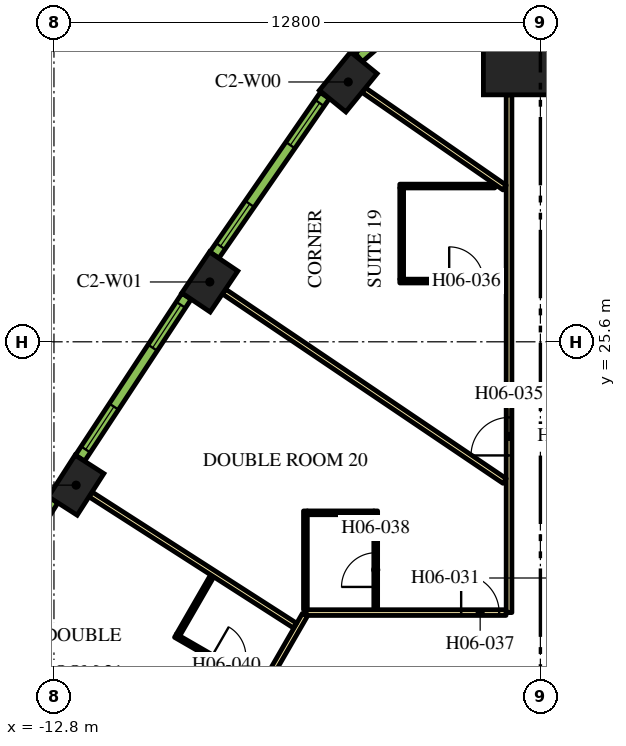
"""IFC4 building model, lengths in metres.
Left out: names, types, materials, properties, quantities, classifications, styles, units other than length and angle.
Written with IfcOpenShell. Run it as: python <this file> out.ifc"""

import sys

from ifc_helpers import new_model, si_unit, direction, frame, frame_2d, origin, origin_2d, place, context, subcontext, project, spatial, rectangle, extrude, element, fill, save


model = new_model("IFC4")
c1 = context("Model", 3, precision=1e-05, world=origin(), true_north=direction((0.0, 1.0)))
c2 = subcontext(c1, "Body", "Model", "MODEL_VIEW")
j1 = project(units=[si_unit("LENGTHUNIT", "METRE"), si_unit("PLANEANGLEUNIT", "RADIAN")], contexts=[c1])
p1 = place(None, origin())
s1 = spatial("IfcSite", under=j1, at=p1, CompositionType="ELEMENT")
p2 = place(p1, origin())
s2 = spatial("IfcBuilding", under=s1, at=p2, CompositionType="ELEMENT")
p3 = place(p2, frame((0.0, 0.0, 87.6)))
s3 = spatial("IfcBuildingStorey", under=s2, at=p3, CompositionType="ELEMENT", Elevation=87.6)
p4 = place(p3, frame((0.0, 33.598, 0.0), z_axis=(0.0, 0.0, 1.0), x_axis=(0.0, 1.0, 0.0)))
e1 = element("IfcColumn", 1, at=p4, inside=s3, PredefinedType="COLUMN", context=c2, shape_type="SweptSolid", body=[
    extrude(rectangle(XDim=3.0, YDim=3.0, at=origin_2d()), origin(), (0.0, 0.0, 1.0), 3.9),
])
for number, where, z_axis, x_axis in (
    (2, (-5.056, 32.437, 0.0), (0.0, 0.0, 1.0), (-0.632, -0.775, 0.0)),
    (3, (-8.699, 27.174, 0.0), (0.0, 0.0, 1.0), (-0.559, -0.829, 0.0)),
    (4, (-12.217, 21.828, 0.0), (0.0, 0.0, 1.0), (-0.54, -0.842, 0.0)),
):
    element("IfcColumn", number, at=place(p3, frame(where, z_axis=z_axis, x_axis=x_axis)), inside=s3, PredefinedType="COLUMN", context=c2, shape_type="SweptSolid", body=[
        extrude(rectangle(XDim=1.3, YDim=0.9, at=origin_2d()), origin(), (0.0, 0.0, 1.0), 3.9),
    ])
p5 = place(p3, frame((-0.825, 18.475, 0.0), z_axis=(0.0, 0.0, 1.0), x_axis=(0.0, 1.0, 0.0)))
e5 = element("IfcWall", 5, at=p5, inside=s3, PredefinedType="PARTITIONING", context=c2, shape_type="SweptSolid", body=[
    extrude(rectangle(XDim=13.623, YDim=0.15, at=frame_2d((6.812, 0.0))), origin(), (0.0, 0.0, 1.0), 2.75),
])
p6 = place(p5, frame((4.135, 0.0, 0.0)))
e6 = element("IfcOpeningElement", 6, at=p6, cuts=e5, PredefinedType="OPENING", context=c2, shape_type="SweptSolid", body=[
    extrude(rectangle(XDim=1.0, YDim=2.1, at=frame_2d((0.5, 1.05))), frame((0.0, 0.085, 0.0), z_axis=(0.0, -1.0, 0.0), x_axis=(1.0, 0.0, 0.0)), (0.0, 0.0, 1.0), 0.17),
])
p7 = place(p3, frame((-6.163, 18.475, 0.0), z_axis=(0.0, 0.0, 1.0), x_axis=(1.0, 0.0, 0.0)))
e7 = element("IfcWall", 7, at=p7, inside=s3, PredefinedType="PARTITIONING", context=c2, shape_type="SweptSolid", body=[
    extrude(rectangle(XDim=5.258, YDim=0.15, at=frame_2d((2.629, 0.0))), origin(), (0.0, 0.0, 1.0), 2.75),
])
p8 = place(p7, frame((4.078, 0.0, 0.0)))
e8 = element("IfcOpeningElement", 8, at=p8, cuts=e7, PredefinedType="OPENING", context=c2, shape_type="SweptSolid", body=[
    extrude(rectangle(XDim=1.0, YDim=2.1, at=frame_2d((0.5, 1.05))), frame((0.0, 0.085, 0.0), z_axis=(0.0, -1.0, 0.0), x_axis=(1.0, 0.0, 0.0)), (0.0, 0.0, 1.0), 0.17),
])
p9 = place(p3, frame((-19.081, -3.9, 0.0), z_axis=(0.0, 0.0, 1.0), x_axis=(0.499998313975, 0.866026377209, 0.0)))
e9 = element("IfcWall", 9, at=p9, inside=s3, PredefinedType="PARTITIONING", context=c2, shape_type="SweptSolid", body=[
    extrude(rectangle(XDim=25.766, YDim=0.15, at=frame_2d((12.883, 0.0))), origin(), (0.0, 0.0, 1.0), 2.75),
])
p10 = place(p9, frame((19.306, 0.0, 0.0)))
e10 = element("IfcOpeningElement", 10, at=p10, cuts=e9, PredefinedType="OPENING", context=c2, shape_type="SweptSolid", body=[
    extrude(rectangle(XDim=1.0, YDim=2.1, at=frame_2d((0.5, 1.05))), frame((0.0, 0.085, 0.0), z_axis=(0.0, -1.0, 0.0), x_axis=(1.0, 0.0, 0.0)), (0.0, 0.0, 1.0), 0.17),
])
p11 = place(p9, frame((18.0, 0.0, 0.0)))
e11 = element("IfcOpeningElement", 11, at=p11, cuts=e9, PredefinedType="OPENING", context=c2, shape_type="SweptSolid", body=[
    extrude(rectangle(XDim=1.0, YDim=2.1, at=frame_2d((0.5, 1.05))), frame((0.0, 0.085, 0.0), z_axis=(0.0, -1.0, 0.0), x_axis=(1.0, 0.0, 0.0)), (0.0, 0.0, 1.0), 0.17),
])
p12 = place(p9, frame((10.874, 0.0, 0.0)))
e12 = element("IfcOpeningElement", 12, at=p12, cuts=e9, PredefinedType="OPENING", context=c2, shape_type="SweptSolid", body=[
    extrude(rectangle(XDim=0.9, YDim=2.1, at=frame_2d((0.45, 1.05))), frame((0.0, 0.085, 0.0), z_axis=(0.0, -1.0, 0.0), x_axis=(1.0, 0.0, 0.0)), (0.0, 0.0, 1.0), 0.17),
])
p13 = place(p9, frame((8.548, 0.0, 0.0)))
e13 = element("IfcOpeningElement", 13, at=p13, cuts=e9, PredefinedType="OPENING", context=c2, shape_type="SweptSolid", body=[
    extrude(rectangle(XDim=1.1, YDim=2.1, at=frame_2d((0.55, 1.05))), frame((0.0, 0.085, 0.0), z_axis=(0.0, -1.0, 0.0), x_axis=(1.0, 0.0, 0.0)), (0.0, 0.0, 1.0), 0.17),
])
p14 = place(p9, frame((0.18, 0.0, 0.0)))
e14 = element("IfcOpeningElement", 14, at=p14, cuts=e9, PredefinedType="OPENING", context=c2, shape_type="SweptSolid", body=[
    extrude(rectangle(XDim=1.0, YDim=2.1, at=frame_2d((0.5, 1.05))), frame((0.0, 0.085, 0.0), z_axis=(0.0, -1.0, 0.0), x_axis=(1.0, 0.0, 0.0)), (0.0, 0.0, 1.0), 0.17),
])
p15 = place(p3, frame((-11.838, 21.585, 0.0), z_axis=(0.0, 0.0, 1.0), x_axis=(0.841699322813, -0.539946525108, 0.0)))
e15 = element("IfcWall", 15, at=p15, inside=s3, PredefinedType="PARTITIONING", context=c2, shape_type="SweptSolid", body=[
    extrude(rectangle(XDim=6.392, YDim=0.15, at=frame_2d((3.196, 0.0))), origin(), (0.0, 0.0, 1.0), 2.75),
])
p16 = place(p3, frame((-8.326, 26.923, 0.0), z_axis=(0.0, 0.0, 1.0), x_axis=(0.828836601893, -0.5594907393, 0.0)))
e16 = element("IfcWall", 16, at=p16, inside=s3, PredefinedType="PARTITIONING", context=c2, shape_type="SweptSolid", body=[
    extrude(rectangle(XDim=8.909, YDim=0.15, at=frame_2d((4.455, 0.0))), origin(), (0.0, 0.0, 1.0), 2.75),
])
p17 = place(p3, frame((-4.649, 32.223, 0.0), z_axis=(0.0, 0.0, 1.0), x_axis=(0.822262349475, -0.569108626394, 0.0)))
e17 = element("IfcWall", 17, at=p17, inside=s3, PredefinedType="PARTITIONING", context=c2, shape_type="SweptSolid", body=[
    extrude(rectangle(XDim=4.51, YDim=0.15, at=frame_2d((2.255, 0.0))), origin(), (0.0, 0.0, 1.0), 2.75),
])
p18 = place(p3, frame((-3.7, 27.198, 0.0), z_axis=(0.0, 0.0, 1.0), x_axis=(1.0, 0.0, 0.0)))
e18 = element("IfcWall", 18, at=p18, inside=s3, PredefinedType="PARTITIONING", context=c2, shape_type="SweptSolid", body=[
    extrude(rectangle(XDim=2.8, YDim=0.1, at=frame_2d((1.4, 0.0))), origin(), (0.0, 0.0, 1.0), 2.75),
])
p19 = place(p18, frame((1.3, 0.0, 0.0)))
e19 = element("IfcOpeningElement", 19, at=p19, cuts=e18, PredefinedType="OPENING", context=c2, shape_type="SweptSolid", body=[
    extrude(rectangle(XDim=0.9, YDim=2.1, at=frame_2d((0.45, 1.05))), frame((0.0, 0.06, 0.0), z_axis=(0.0, -1.0, 0.0), x_axis=(1.0, 0.0, 0.0)), (0.0, 0.0, 1.0), 0.12),
])
p20 = place(p3, frame((-3.65, 27.248, 0.0), z_axis=(0.0, 0.0, 1.0), x_axis=(0.0, 1.0, 0.0)))
e20 = element("IfcWall", 20, at=p20, inside=s3, PredefinedType="PARTITIONING", context=c2, shape_type="SweptSolid", body=[
    extrude(rectangle(XDim=2.4, YDim=0.1, at=frame_2d((1.2, 0.0))), origin(), (0.0, 0.0, 1.0), 2.75),
])
p21 = place(p3, frame((-1.2, 29.698, 0.0), z_axis=(0.0, 0.0, 1.0), x_axis=(-1.0, 0.0, 0.0)))
e21 = element("IfcWall", 21, at=p21, inside=s3, PredefinedType="PARTITIONING", context=c2, shape_type="SweptSolid", body=[
    extrude(rectangle(XDim=2.5, YDim=0.1, at=frame_2d((1.25, 0.0))), origin(), (0.0, 0.0, 1.0), 2.75),
])
p22 = place(p3, frame((-4.333, 18.55, 0.0), z_axis=(0.0, 0.0, 1.0), x_axis=(0.0, 1.0, 0.0)))
e22 = element("IfcWall", 22, at=p22, inside=s3, PredefinedType="PARTITIONING", context=c2, shape_type="SweptSolid", body=[
    extrude(rectangle(XDim=2.6, YDim=0.1, at=frame_2d((1.3, 0.0))), origin(), (0.0, 0.0, 1.0), 2.75),
])
p23 = place(p22, frame((0.6, 0.0, 0.0)))
e23 = element("IfcOpeningElement", 23, at=p23, cuts=e22, PredefinedType="OPENING", context=c2, shape_type="SweptSolid", body=[
    extrude(rectangle(XDim=0.9, YDim=2.1, at=frame_2d((0.45, 1.05))), frame((0.0, 0.06, 0.0), z_axis=(0.0, -1.0, 0.0), x_axis=(1.0, 0.0, 0.0)), (0.0, 0.0, 1.0), 0.12),
])
p24 = place(p3, frame((-4.383, 21.1, 0.0), z_axis=(0.0, 0.0, 1.0), x_axis=(-1.0, 0.0, 0.0)))
e24 = element("IfcWall", 24, at=p24, inside=s3, PredefinedType="PARTITIONING", context=c2, shape_type="SweptSolid", body=[
    extrude(rectangle(XDim=1.75, YDim=0.1, at=frame_2d((0.875, 0.0))), origin(), (0.0, 0.0, 1.0), 2.75),
])
p25 = place(p3, frame((-6.183, 18.55, 0.0), z_axis=(0.0, 0.0, 1.0), x_axis=(0.0, 1.0, 0.0)))
e25 = element("IfcWall", 25, at=p25, inside=s3, PredefinedType="PARTITIONING", context=c2, shape_type="SweptSolid", body=[
    extrude(rectangle(XDim=2.6, YDim=0.1, at=frame_2d((1.3, 0.0))), origin(), (0.0, 0.0, 1.0), 2.75),
])
p26 = place(p3, frame((-9.603, 17.868, 0.0), z_axis=(0.0, 0.0, 1.0), x_axis=(0.866021400173, -0.500006934395, 0.0)))
e26 = element("IfcWall", 26, at=p26, inside=s3, PredefinedType="PARTITIONING", context=c2, shape_type="SweptSolid", body=[
    extrude(rectangle(XDim=2.6, YDim=0.1, at=frame_2d((1.3, 0.0))), origin(), (0.0, 0.0, 1.0), 2.75),
])
p27 = place(p26, frame((1.1, 0.0, 0.0)))
e27 = element("IfcOpeningElement", 27, at=p27, cuts=e26, PredefinedType="OPENING", context=c2, shape_type="SweptSolid", body=[
    extrude(rectangle(XDim=0.9, YDim=2.1, at=frame_2d((0.45, 1.05))), frame((0.0, 0.06, 0.0), z_axis=(0.0, -1.0, 0.0), x_axis=(1.0, 0.0, 0.0)), (0.0, 0.0, 1.0), 0.12),
])
p28 = place(p3, frame((-9.534, 17.886, 0.0), z_axis=(0.0, 0.0, 1.0), x_axis=(0.500041240653, 0.866001592173, 0.0)))
e28 = element("IfcWall", 28, at=p28, inside=s3, PredefinedType="PARTITIONING", context=c2, shape_type="SweptSolid", body=[
    extrude(rectangle(XDim=1.79, YDim=0.1, at=frame_2d((0.895, 0.0))), origin(), (0.0, 0.0, 1.0), 2.75),
])
p29 = place(p3, frame((-3.405, 34.275, 0.0), z_axis=(0.0, 0.0, 1.0), x_axis=(-0.754882764627, -0.655859749999, 0.0)))
e29 = element("IfcWall", 29, at=p29, inside=s3, PredefinedType="SOLIDWALL", context=c2, shape_type="SweptSolid", body=[
    extrude(rectangle(XDim=1.82, YDim=0.29, at=frame_2d((0.91, 0.0))), origin(), (0.0, 0.0, 1.0), 3.65),
])
p30 = place(p29, frame((0.46, 0.0, 0.9)))
e30 = element("IfcOpeningElement", 30, at=p30, cuts=e29, PredefinedType="OPENING", context=c2, shape_type="SweptSolid", body=[
    extrude(rectangle(XDim=0.9, YDim=2.15, at=frame_2d((0.45, 1.075))), frame((0.0, 0.155, 0.0), z_axis=(0.0, -1.0, 0.0), x_axis=(1.0, 0.0, 0.0)), (0.0, 0.0, 1.0), 0.31),
])
p31 = place(p3, frame((-5.673, 32.081, 0.0), z_axis=(0.0, 0.0, 1.0), x_axis=(-0.569113019126, -0.822259309136, 0.0)))
e31 = element("IfcWall", 31, at=p31, inside=s3, PredefinedType="SOLIDWALL", context=c2, shape_type="SweptSolid", body=[
    extrude(rectangle(XDim=5.107, YDim=0.29, at=frame_2d((2.553, 0.0))), origin(), (0.0, 0.0, 1.0), 3.65),
])
p32 = place(p31, frame((0.24, 0.0, 0.9)))
e32 = element("IfcOpeningElement", 32, at=p32, cuts=e31, PredefinedType="OPENING", context=c2, shape_type="SweptSolid", body=[
    extrude(rectangle(XDim=1.35, YDim=2.15, at=frame_2d((0.675, 1.075))), frame((0.0, 0.155, 0.0), z_axis=(0.0, -1.0, 0.0), x_axis=(1.0, 0.0, 0.0)), (0.0, 0.0, 1.0), 0.31),
])
p33 = place(p31, frame((3.471, 0.0, 0.9)))
e33 = element("IfcOpeningElement", 33, at=p33, cuts=e31, PredefinedType="OPENING", context=c2, shape_type="SweptSolid", body=[
    extrude(rectangle(XDim=1.35, YDim=2.15, at=frame_2d((0.675, 1.075))), frame((0.0, 0.155, 0.0), z_axis=(0.0, -1.0, 0.0), x_axis=(1.0, 0.0, 0.0)), (0.0, 0.0, 1.0), 0.31),
])
p34 = place(p3, frame((-9.311, 26.799, 0.0), z_axis=(0.0, 0.0, 1.0), x_axis=(-0.549741341923, -0.835334937005, 0.0)))
e34 = element("IfcWall", 34, at=p34, inside=s3, PredefinedType="SOLIDWALL", context=c2, shape_type="SweptSolid", body=[
    extrude(rectangle(XDim=5.1, YDim=0.29, at=frame_2d((2.55, 0.0))), origin(), (0.0, 0.0, 1.0), 3.65),
])
p35 = place(p34, frame((0.273, 0.0, 0.9)))
e35 = element("IfcOpeningElement", 35, at=p35, cuts=e34, PredefinedType="OPENING", context=c2, shape_type="SweptSolid", body=[
    extrude(rectangle(XDim=1.35, YDim=2.15, at=frame_2d((0.675, 1.075))), frame((0.0, 0.155, 0.0), z_axis=(0.0, -1.0, 0.0), x_axis=(1.0, 0.0, 0.0)), (0.0, 0.0, 1.0), 0.31),
])
p36 = place(p34, frame((3.478, 0.0, 0.9)))
e36 = element("IfcOpeningElement", 36, at=p36, cuts=e34, PredefinedType="OPENING", context=c2, shape_type="SweptSolid", body=[
    extrude(rectangle(XDim=1.35, YDim=2.15, at=frame_2d((0.675, 1.075))), frame((0.0, 0.155, 0.0), z_axis=(0.0, -1.0, 0.0), x_axis=(1.0, 0.0, 0.0)), (0.0, 0.0, 1.0), 0.31),
])
p37 = place(p3, frame((-12.82, 21.439, 0.0), z_axis=(0.0, 0.0, 1.0), x_axis=(-0.530072082134, -0.847952585787, 0.0)))
e37 = element("IfcWall", 37, at=p37, inside=s3, PredefinedType="SOLIDWALL", context=c2, shape_type="SweptSolid", body=[
    extrude(rectangle(XDim=5.1, YDim=0.29, at=frame_2d((2.55, 0.0))), origin(), (0.0, 0.0, 1.0), 3.65),
])
p38 = place(p37, frame((0.273, 0.0, 0.9)))
e38 = element("IfcOpeningElement", 38, at=p38, cuts=e37, PredefinedType="OPENING", context=c2, shape_type="SweptSolid", body=[
    extrude(rectangle(XDim=1.35, YDim=2.15, at=frame_2d((0.675, 1.075))), frame((0.0, 0.155, 0.0), z_axis=(0.0, -1.0, 0.0), x_axis=(1.0, 0.0, 0.0)), (0.0, 0.0, 1.0), 0.31),
])
p39 = place(p37, frame((3.478, 0.0, 0.9)))
e39 = element("IfcOpeningElement", 39, at=p39, cuts=e37, PredefinedType="OPENING", context=c2, shape_type="SweptSolid", body=[
    extrude(rectangle(XDim=1.35, YDim=2.15, at=frame_2d((0.675, 1.075))), frame((0.0, 0.155, 0.0), z_axis=(0.0, -1.0, 0.0), x_axis=(1.0, 0.0, 0.0)), (0.0, 0.0, 1.0), 0.31),
])
p40 = place(p6, origin())
e40 = element("IfcDoor", 40, at=p40, inside=s3, OperationType="SINGLE_SWING_LEFT", PredefinedType="DOOR", context=c2, shape_type="SweptSolid", body=[
    extrude(rectangle(XDim=1.0, YDim=2.1, at=frame_2d((0.5, 1.05))), frame((0.0, 0.025, 0.0), z_axis=(0.0, -1.0, 0.0), x_axis=(1.0, 0.0, 0.0)), (0.0, 0.0, 1.0), 0.05),
])
fill(e6, e40)
p41 = place(p19, origin())
e41 = element("IfcDoor", 41, at=p41, inside=s3, OperationType="SINGLE_SWING_LEFT", PredefinedType="DOOR", context=c2, shape_type="SweptSolid", body=[
    extrude(rectangle(XDim=0.9, YDim=2.1, at=frame_2d((0.45, 1.05))), frame((0.0, 0.025, 0.0), z_axis=(0.0, -1.0, 0.0), x_axis=(1.0, 0.0, 0.0)), (0.0, 0.0, 1.0), 0.05),
])
fill(e19, e41)
p42 = place(p8, origin())
e42 = element("IfcDoor", 42, at=p42, inside=s3, OperationType="SINGLE_SWING_RIGHT", PredefinedType="DOOR", context=c2, shape_type="SweptSolid", body=[
    extrude(rectangle(XDim=1.0, YDim=2.1, at=frame_2d((0.5, 1.05))), frame((0.0, 0.025, 0.0), z_axis=(0.0, -1.0, 0.0), x_axis=(1.0, 0.0, 0.0)), (0.0, 0.0, 1.0), 0.05),
])
fill(e8, e42)
p43 = place(p23, origin())
e43 = element("IfcDoor", 43, at=p43, inside=s3, OperationType="SINGLE_SWING_LEFT", PredefinedType="DOOR", context=c2, shape_type="SweptSolid", body=[
    extrude(rectangle(XDim=0.9, YDim=2.1, at=frame_2d((0.45, 1.05))), frame((0.0, 0.025, 0.0), z_axis=(0.0, -1.0, 0.0), x_axis=(1.0, 0.0, 0.0)), (0.0, 0.0, 1.0), 0.05),
])
fill(e23, e43)
p44 = place(p27, origin())
e44 = element("IfcDoor", 44, at=p44, inside=s3, OperationType="SINGLE_SWING_RIGHT", PredefinedType="DOOR", context=c2, shape_type="SweptSolid", body=[
    extrude(rectangle(XDim=0.9, YDim=2.1, at=frame_2d((0.45, 1.05))), frame((0.0, 0.025, 0.0), z_axis=(0.0, -1.0, 0.0), x_axis=(1.0, 0.0, 0.0)), (0.0, 0.0, 1.0), 0.05),
])
fill(e27, e44)
p45 = place(p32, origin())
e45 = element("IfcWindow", 45, at=p45, inside=s3, PartitioningType="DOUBLE_PANEL_VERTICAL", PredefinedType="WINDOW", context=c2, shape_type="SweptSolid", body=[
    extrude(rectangle(XDim=1.35, YDim=2.15, at=frame_2d((0.675, 1.075))), frame((0.0, 0.015, 0.0), z_axis=(0.0, -1.0, 0.0), x_axis=(1.0, 0.0, 0.0)), (0.0, 0.0, 1.0), 0.06),
])
fill(e32, e45)
p46 = place(p33, origin())
e46 = element("IfcWindow", 46, at=p46, inside=s3, PartitioningType="DOUBLE_PANEL_VERTICAL", PredefinedType="WINDOW", context=c2, shape_type="SweptSolid", body=[
    extrude(rectangle(XDim=1.35, YDim=2.15, at=frame_2d((0.675, 1.075))), frame((0.0, 0.015, 0.0), z_axis=(0.0, -1.0, 0.0), x_axis=(1.0, 0.0, 0.0)), (0.0, 0.0, 1.0), 0.06),
])
fill(e33, e46)
p47 = place(p35, origin())
e47 = element("IfcWindow", 47, at=p47, inside=s3, PartitioningType="DOUBLE_PANEL_VERTICAL", PredefinedType="WINDOW", context=c2, shape_type="SweptSolid", body=[
    extrude(rectangle(XDim=1.35, YDim=2.15, at=frame_2d((0.675, 1.075))), frame((0.0, 0.015, 0.0), z_axis=(0.0, -1.0, 0.0), x_axis=(1.0, 0.0, 0.0)), (0.0, 0.0, 1.0), 0.06),
])
fill(e35, e47)
p48 = place(p36, origin())
e48 = element("IfcWindow", 48, at=p48, inside=s3, PartitioningType="DOUBLE_PANEL_VERTICAL", PredefinedType="WINDOW", context=c2, shape_type="SweptSolid", body=[
    extrude(rectangle(XDim=1.35, YDim=2.15, at=frame_2d((0.675, 1.075))), frame((0.0, 0.015, 0.0), z_axis=(0.0, -1.0, 0.0), x_axis=(1.0, 0.0, 0.0)), (0.0, 0.0, 1.0), 0.06),
])
fill(e36, e48)
save(model, sys.argv[1])
